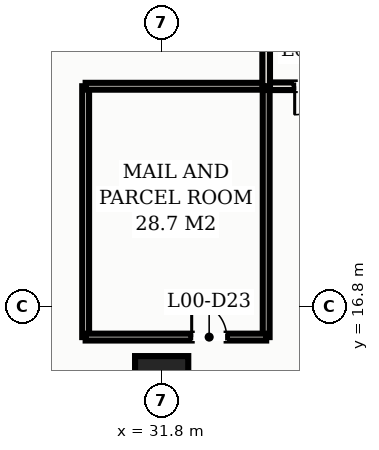
"""IFC4 building model, lengths in metres.
Left out: names, types, materials, properties, quantities, classifications, styles, units other than length and angle.
Written with IfcOpenShell. Run it as: python <this file> out.ifc"""

import sys

from ifc_helpers import new_model, si_unit, direction, frame, frame_2d, origin, origin_2d, place, context, subcontext, project, spatial, rectangle, hollow_rectangle, extrude, element, fill, save


model = new_model("IFC4")
c1 = context("Model", 3, precision=1e-05, world=origin(), true_north=direction((0.0, 1.0)))
c2 = subcontext(c1, "Body", "Model", "MODEL_VIEW")
j1 = project(units=[si_unit("LENGTHUNIT", "METRE"), si_unit("PLANEANGLEUNIT", "RADIAN")], contexts=[c1])
p1 = place(None, origin())
s1 = spatial("IfcSite", under=j1, at=p1, CompositionType="ELEMENT")
p2 = place(p1, origin())
s2 = spatial("IfcBuilding", under=s1, at=p2, CompositionType="ELEMENT")
p3 = place(p2, origin())
s3 = spatial("IfcBuildingStorey", under=s2, at=p3, CompositionType="ELEMENT", Elevation=0.0)
p4 = place(p3, frame((31.8, 14.8, 0.0), z_axis=(0.0, 0.0, 1.0), x_axis=(1.0, 0.0, 0.0)))
e1 = element("IfcColumn", 1, at=p4, inside=s3, PredefinedType="COLUMN", context=c2, shape_type="SweptSolid", body=[
    extrude(hollow_rectangle(XDim=1.4, YDim=1.4, WallThickness=0.045, at=origin_2d()), origin(), (0.0, 0.0, 1.0), 5.2),
])
p5 = place(p3, frame((29.8, 16.0, 0.0), z_axis=(0.0, 0.0, 1.0), x_axis=(0.0, 1.0, 0.0)))
e2 = element("IfcWall", 2, at=p5, inside=s3, PredefinedType="PARTITIONING", context=c2, shape_type="SweptSolid", body=[
    extrude(rectangle(XDim=6.6, YDim=0.18, at=frame_2d((3.3, 0.0))), origin(), (0.0, 0.0, 1.0), 4.95),
])
p6 = place(p3, frame((29.8, 22.6, 0.0), z_axis=(0.0, 0.0, 1.0), x_axis=(1.0, 0.0, 0.0)))
e3 = element("IfcWall", 3, at=p6, inside=s3, PredefinedType="PARTITIONING", context=c2, shape_type="SweptSolid", body=[
    extrude(rectangle(XDim=4.75, YDim=0.18, at=frame_2d((2.375, 0.0))), origin(), (0.0, 0.0, 1.0), 4.95),
])
p7 = place(p3, frame((34.55, 16.0, 0.0), z_axis=(0.0, 0.0, 1.0), x_axis=(0.0, 1.0, 0.0)))
e4 = element("IfcWall", 4, at=p7, inside=s3, PredefinedType="PARTITIONING", context=c2, shape_type="SweptSolid", body=[
    extrude(rectangle(XDim=6.6, YDim=0.18, at=frame_2d((3.3, 0.0))), origin(), (0.0, 0.0, 1.0), 4.95),
])
p8 = place(p3, frame((29.8, 16.0, 0.0), z_axis=(0.0, 0.0, 1.0), x_axis=(1.0, 0.0, 0.0)))
e5 = element("IfcWall", 5, at=p8, inside=s3, PredefinedType="PARTITIONING", context=c2, shape_type="SweptSolid", body=[
    extrude(rectangle(XDim=4.75, YDim=0.18, at=frame_2d((2.375, 0.0))), origin(), (0.0, 0.0, 1.0), 4.95),
])
p9 = place(p8, frame((2.79, 0.0, 0.0)))
e6 = element("IfcOpeningElement", 6, at=p9, cuts=e5, PredefinedType="OPENING", context=c2, shape_type="SweptSolid", body=[
    extrude(rectangle(XDim=0.92, YDim=2.15, at=frame_2d((0.46, 1.075))), frame((0.0, 0.1, 0.0), z_axis=(0.0, -1.0, 0.0), x_axis=(1.0, 0.0, 0.0)), (0.0, 0.0, 1.0), 0.2),
])
p10 = place(p3, frame((34.55, 22.6, 0.0), z_axis=(0.0, 0.0, 1.0), x_axis=(1.0, 0.0, 0.0)))
e7 = element("IfcWall", 7, at=p10, inside=s3, PredefinedType="PARTITIONING", context=c2, shape_type="SweptSolid", body=[
    extrude(rectangle(XDim=3.05, YDim=0.2, at=frame_2d((1.525, 0.0))), origin(), (0.0, 0.0, 1.0), 4.95),
])
p11 = place(p10, frame((0.75, 0.0, 0.0)))
e8 = element("IfcOpeningElement", 8, at=p11, cuts=e7, PredefinedType="OPENING", context=c2, shape_type="SweptSolid", body=[
    extrude(rectangle(XDim=1.5, YDim=2.25, at=frame_2d((0.75, 1.125))), frame((0.0, 0.11, 0.0), z_axis=(0.0, -1.0, 0.0), x_axis=(1.0, 0.0, 0.0)), (0.0, 0.0, 1.0), 0.22),
])
p12 = place(p3, frame((34.55, 22.6, 0.0), z_axis=(0.0, 0.0, 1.0), x_axis=(0.0, 1.0, 0.0)))
e9 = element("IfcWall", 9, at=p12, inside=s3, PredefinedType="PARTITIONING", context=c2, shape_type="SweptSolid", body=[
    extrude(rectangle(XDim=2.6, YDim=0.2, at=frame_2d((1.3, 0.0))), origin(), (0.0, 0.0, 1.0), 4.95),
])
p13 = place(p9, origin())
e10 = element("IfcDoor", 10, at=p13, inside=s3, OperationType="SINGLE_SWING_LEFT", PredefinedType="DOOR", context=c2, shape_type="SweptSolid", body=[
    extrude(rectangle(XDim=0.92, YDim=2.15, at=frame_2d((0.46, 1.075))), frame((0.0, 0.025, 0.0), z_axis=(0.0, -1.0, 0.0), x_axis=(1.0, 0.0, 0.0)), (0.0, 0.0, 1.0), 0.05),
])
fill(e6, e10)
p14 = place(p11, frame((1.5, 0.0, 0.0), z_axis=(0.0, 0.0, 1.0), x_axis=(-1.0, 0.0, 0.0)))
e11 = element("IfcDoor", 11, at=p14, inside=s3, OperationType="DOUBLE_DOOR_SINGLE_SWING", PredefinedType="DOOR", context=c2, shape_type="SweptSolid", body=[
    extrude(rectangle(XDim=1.5, YDim=2.25, at=frame_2d((0.75, 1.125))), frame((0.0, 0.025, 0.0), z_axis=(0.0, -1.0, 0.0), x_axis=(1.0, 0.0, 0.0)), (0.0, 0.0, 1.0), 0.05),
])
fill(e8, e11)
save(model, sys.argv[1])
